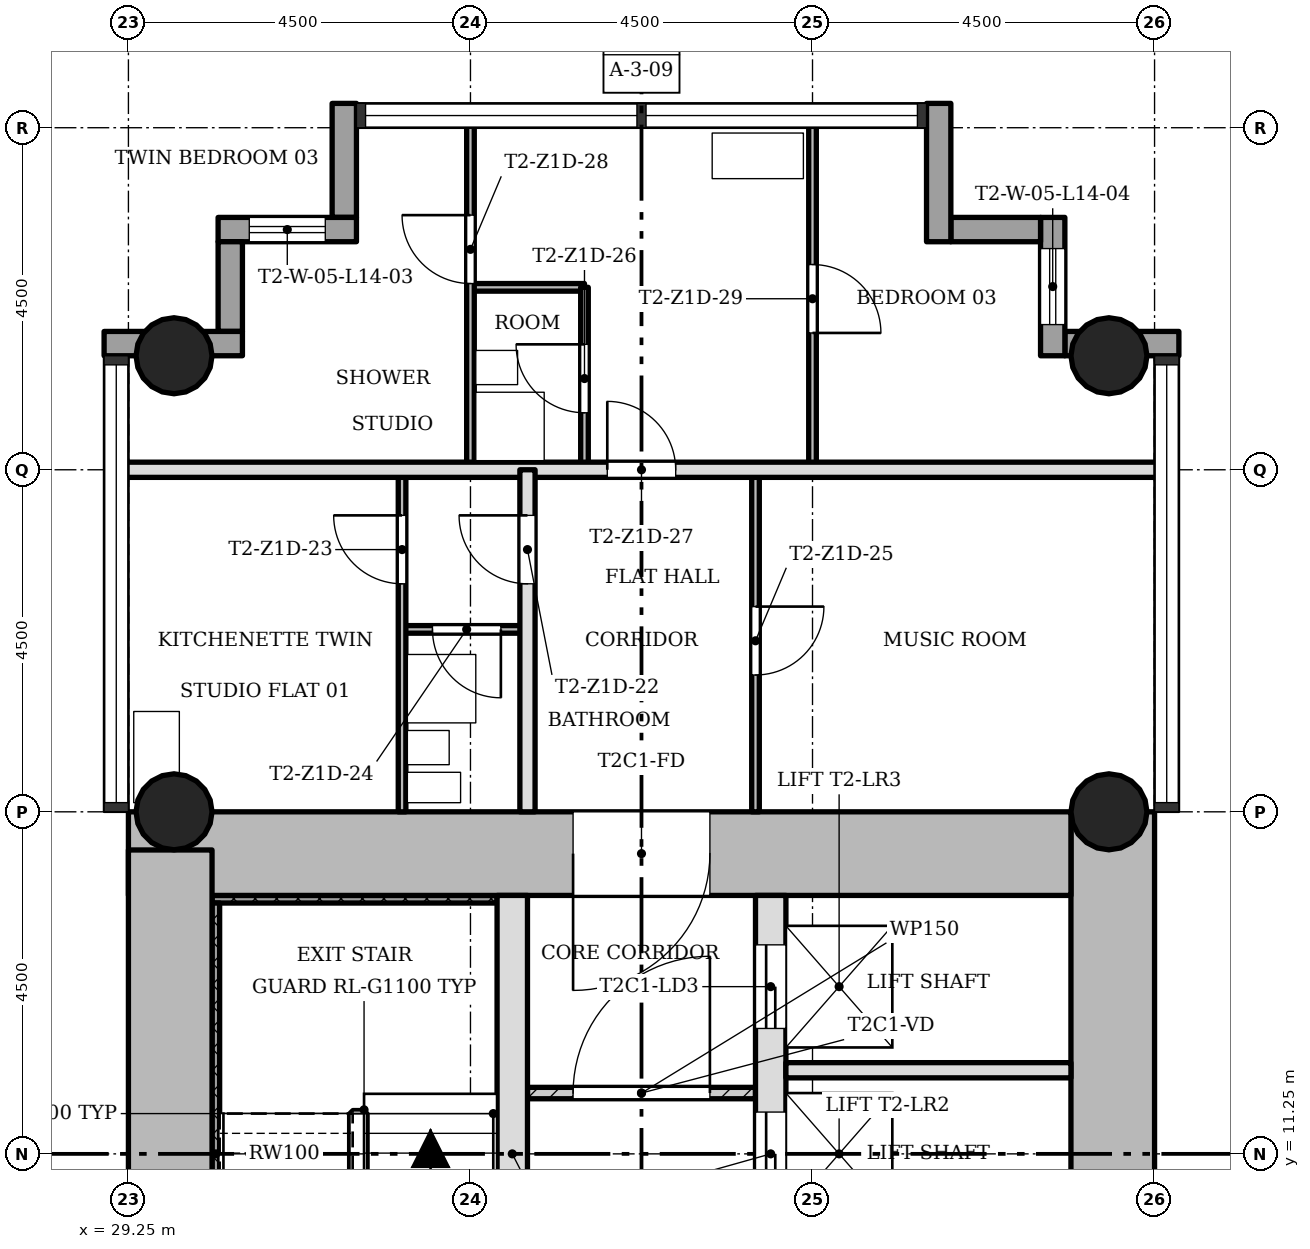
"""IFC4 building model, lengths in metres.
Left out: names, types, materials, properties, quantities, classifications, styles, units other than length and angle.
Written with IfcOpenShell. Run it as: python <this file> out.ifc"""

import sys

from ifc_helpers import new_model, si_unit, direction, frame, frame_2d, origin, origin_2d, place, context, subcontext, project, spatial, rectangle, hollow_circle, extrude, element, fill, save


model = new_model("IFC4")
c1 = context("Model", 3, precision=1e-05, world=origin(), true_north=direction((0.0, 1.0)))
c2 = subcontext(c1, "Body", "Model", "MODEL_VIEW")
j1 = project(units=[si_unit("LENGTHUNIT", "METRE"), si_unit("PLANEANGLEUNIT", "RADIAN")], contexts=[c1])
p1 = place(None, origin())
s1 = spatial("IfcSite", under=j1, at=p1, CompositionType="ELEMENT")
p2 = place(p1, origin())
s2 = spatial("IfcBuilding", under=s1, at=p2, CompositionType="ELEMENT")
p3 = place(p2, frame((0.0, 0.0, 55.1)))
s3 = spatial("IfcBuildingStorey", under=s2, at=p3, CompositionType="ELEMENT", Elevation=55.1)
p4 = place(p3, frame((42.2, 7.85, 0.0), z_axis=(0.0, 0.0, 1.0), x_axis=(0.0, 1.0, 0.0)))
e1 = element("IfcWall", 1, at=p4, inside=s3, PredefinedType="SHEAR", context=c2, shape_type="SweptSolid", body=[
    extrude(rectangle(XDim=7.9, YDim=1.1, at=frame_2d((3.95, 0.0))), origin(), (0.0, 0.0, 1.0), 3.4),
])
p5 = place(p3, frame((41.65, 15.2, 0.0), z_axis=(0.0, 0.0, 1.0), x_axis=(-1.0, 0.0, 0.0)))
e2 = element("IfcWall", 2, at=p5, inside=s3, PredefinedType="SHEAR", context=c2, shape_type="SweptSolid", body=[
    extrude(rectangle(XDim=12.4, YDim=1.1, at=frame_2d((6.2, 0.0))), origin(), (0.0, 0.0, 1.0), 3.4),
])
p6 = place(p5, frame((4.75, 0.0, 0.0)))
e3 = element("IfcOpeningElement", 3, at=p6, cuts=e2, PredefinedType="OPENING", context=c2, shape_type="SweptSolid", body=[
    extrude(rectangle(XDim=1.8, YDim=2.1, at=frame_2d((0.9, 1.05))), frame((0.0, 0.56, 0.0), z_axis=(0.0, -1.0, 0.0), x_axis=(1.0, 0.0, 0.0)), (0.0, 0.0, 1.0), 1.12),
])
p7 = place(p3, frame((29.8, 15.248, 0.0), z_axis=(0.0, 0.0, 1.0), x_axis=(0.0, -1.0, 0.0)))
e4 = element("IfcWall", 4, at=p7, inside=s3, PredefinedType="SHEAR", context=c2, shape_type="SweptSolid", body=[
    extrude(rectangle(XDim=8.596, YDim=1.1, at=frame_2d((4.298, 0.0))), origin(), (0.0, 0.0, 1.0), 3.4),
])
p8 = place(p3, frame((34.3, 7.85, 0.0), z_axis=(0.0, 0.0, 1.0), x_axis=(0.0, 1.0, 0.0)))
e5 = element("IfcWall", 5, at=p8, inside=s3, PredefinedType="SHEAR", context=c2, shape_type="SweptSolid", body=[
    extrude(rectangle(XDim=6.8, YDim=0.4, at=frame_2d((3.4, 0.0))), origin(), (0.0, 0.0, 1.0), 3.4),
])
p9 = place(p8, frame((0.55, 0.0, 0.0)))
e6 = element("IfcOpeningElement", 6, at=p9, cuts=e5, PredefinedType="OPENING", context=c2, shape_type="SweptSolid", body=[
    extrude(rectangle(XDim=0.9, YDim=2.1, at=frame_2d((0.45, 1.05))), frame((0.0, 0.21, 0.0), z_axis=(0.0, -1.0, 0.0), x_axis=(1.0, 0.0, 0.0)), (0.0, 0.0, 1.0), 0.42),
])
p10 = place(p3, frame((37.7, 7.85, 0.0), z_axis=(0.0, 0.0, 1.0), x_axis=(0.0, 1.0, 0.0)))
e7 = element("IfcWall", 7, at=p10, inside=s3, PredefinedType="SHEAR", context=c2, shape_type="SweptSolid", body=[
    extrude(rectangle(XDim=6.8, YDim=0.4, at=frame_2d((3.4, 0.0))), origin(), (0.0, 0.0, 1.0), 3.4),
])
p11 = place(p10, frame((0.65, 0.0, 0.0)))
e8 = element("IfcOpeningElement", 8, at=p11, cuts=e7, PredefinedType="OPENING", context=c2, shape_type="SweptSolid", body=[
    extrude(rectangle(XDim=1.1, YDim=2.1, at=frame_2d((0.55, 1.05))), frame((0.0, 0.21, 0.0), z_axis=(0.0, -1.0, 0.0), x_axis=(1.0, 0.0, 0.0)), (0.0, 0.0, 1.0), 0.42),
])
p12 = place(p10, frame((2.85, 0.0, 0.0)))
e9 = element("IfcOpeningElement", 9, at=p12, cuts=e7, PredefinedType="OPENING", context=c2, shape_type="SweptSolid", body=[
    extrude(rectangle(XDim=1.1, YDim=2.1, at=frame_2d((0.55, 1.05))), frame((0.0, 0.21, 0.0), z_axis=(0.0, -1.0, 0.0), x_axis=(1.0, 0.0, 0.0)), (0.0, 0.0, 1.0), 0.42),
])
p13 = place(p10, frame((5.05, 0.0, 0.0)))
e10 = element("IfcOpeningElement", 10, at=p13, cuts=e7, PredefinedType="OPENING", context=c2, shape_type="SweptSolid", body=[
    extrude(rectangle(XDim=1.1, YDim=2.1, at=frame_2d((0.55, 1.05))), frame((0.0, 0.21, 0.0), z_axis=(0.0, -1.0, 0.0), x_axis=(1.0, 0.0, 0.0)), (0.0, 0.0, 1.0), 0.42),
])
for number, where, z_axis, x_axis in (
    (11, (42.15, 15.75, 0.0), (0.0, 0.0, 1.0), (1.0, 0.0, 0.0)),
    (12, (29.85, 15.75, 0.0), (0.0, 0.0, 1.0), (1.0, 0.0, 0.0)),
    (13, (42.15, 21.75, 0.0), (0.0, 0.0, 1.0), (1.0, 0.0, 0.0)),
    (14, (29.85, 21.75, 0.0), (0.0, 0.0, 1.0), (1.0, 0.0, 0.0)),
):
    element("IfcColumn", number, at=place(p3, frame(where, z_axis=z_axis, x_axis=x_axis)), inside=s3, PredefinedType="COLUMN", context=c2, shape_type="SweptSolid", body=[
        extrude(hollow_circle(Radius=0.5, WallThickness=0.036, at=origin_2d()), origin(), (0.0, 0.0, 1.0), 3.4),
    ])
p14 = place(p3, frame((43.07, 21.91, -0.3), z_axis=(0.0, 0.0, 1.0), x_axis=(-1.0, 0.0, 0.0)))
e15 = element("IfcWall", 15, at=p14, inside=s3, PredefinedType="STANDARD", context=c2, shape_type="SweptSolid", body=[
    extrude(rectangle(XDim=1.5, YDim=0.32, at=frame_2d((0.75, 0.0))), origin(), (0.0, 0.0, 1.0), 3.4),
])
p15 = place(p3, frame((41.41, 21.75, -0.3), z_axis=(0.0, 0.0, 1.0), x_axis=(0.0, 1.0, 0.0)))
e16 = element("IfcWall", 16, at=p15, inside=s3, PredefinedType="STANDARD", context=c2, shape_type="SweptSolid", body=[
    extrude(rectangle(XDim=1.82, YDim=0.32, at=frame_2d((0.91, 0.0))), origin(), (0.0, 0.0, 1.0), 3.4),
])
p16 = place(p15, frame((0.41, 0.0, 1.2)))
e17 = element("IfcOpeningElement", 17, at=p16, cuts=e16, PredefinedType="OPENING", context=c2, shape_type="SweptSolid", body=[
    extrude(rectangle(XDim=1.0, YDim=1.5, at=frame_2d((0.5, 0.75))), frame((0.0, 0.17, 0.0), z_axis=(0.0, -1.0, 0.0), x_axis=(1.0, 0.0, 0.0)), (0.0, 0.0, 1.0), 0.34),
])
p17 = place(p3, frame((41.25, 23.41, -0.3), z_axis=(0.0, 0.0, 1.0), x_axis=(-1.0, 0.0, 0.0)))
e18 = element("IfcWall", 18, at=p17, inside=s3, PredefinedType="STANDARD", context=c2, shape_type="SweptSolid", body=[
    extrude(rectangle(XDim=1.18, YDim=0.32, at=frame_2d((0.59, 0.0))), origin(), (0.0, 0.0, 1.0), 3.4),
])
p18 = place(p3, frame((39.91, 23.25, -0.3), z_axis=(0.0, 0.0, 1.0), x_axis=(0.0, 1.0, 0.0)))
e19 = element("IfcWall", 19, at=p18, inside=s3, PredefinedType="STANDARD", context=c2, shape_type="SweptSolid", body=[
    extrude(rectangle(XDim=1.82, YDim=0.32, at=frame_2d((0.91, 0.0))), origin(), (0.0, 0.0, 1.0), 3.4),
])
p19 = place(p3, frame((32.09, 25.07, -0.3), z_axis=(0.0, 0.0, 1.0), x_axis=(0.0, -1.0, 0.0)))
e20 = element("IfcWall", 20, at=p19, inside=s3, PredefinedType="STANDARD", context=c2, shape_type="SweptSolid", body=[
    extrude(rectangle(XDim=1.5, YDim=0.32, at=frame_2d((0.75, 0.0))), origin(), (0.0, 0.0, 1.0), 3.4),
])
p20 = place(p3, frame((32.25, 23.41, -0.3), z_axis=(0.0, 0.0, 1.0), x_axis=(-1.0, 0.0, 0.0)))
e21 = element("IfcWall", 21, at=p20, inside=s3, PredefinedType="STANDARD", context=c2, shape_type="SweptSolid", body=[
    extrude(rectangle(XDim=1.82, YDim=0.32, at=frame_2d((0.91, 0.0))), origin(), (0.0, 0.0, 1.0), 3.4),
])
p21 = place(p20, frame((0.41, 0.0, 1.2)))
e22 = element("IfcOpeningElement", 22, at=p21, cuts=e21, PredefinedType="OPENING", context=c2, shape_type="SweptSolid", body=[
    extrude(rectangle(XDim=1.0, YDim=1.5, at=frame_2d((0.5, 0.75))), frame((0.0, 0.17, 0.0), z_axis=(0.0, -1.0, 0.0), x_axis=(1.0, 0.0, 0.0)), (0.0, 0.0, 1.0), 0.34),
])
p22 = place(p3, frame((30.59, 23.25, -0.3), z_axis=(0.0, 0.0, 1.0), x_axis=(0.0, -1.0, 0.0)))
e23 = element("IfcWall", 23, at=p22, inside=s3, PredefinedType="STANDARD", context=c2, shape_type="SweptSolid", body=[
    extrude(rectangle(XDim=1.18, YDim=0.32, at=frame_2d((0.59, 0.0))), origin(), (0.0, 0.0, 1.0), 3.4),
])
p23 = place(p3, frame((30.75, 21.91, -0.3), z_axis=(0.0, 0.0, 1.0), x_axis=(-1.0, 0.0, 0.0)))
e24 = element("IfcWall", 24, at=p23, inside=s3, PredefinedType="STANDARD", context=c2, shape_type="SweptSolid", body=[
    extrude(rectangle(XDim=1.82, YDim=0.32, at=frame_2d((0.91, 0.0))), origin(), (0.0, 0.0, 1.0), 3.4),
])
p24 = place(p3, frame((37.5, 12.05, 0.0), z_axis=(0.0, 0.0, 1.0), x_axis=(-1.0, 0.0, 0.0)))
e25 = element("IfcWall", 25, at=p24, inside=s3, PredefinedType="PARTITIONING", context=c2, shape_type="SweptSolid", body=[
    extrude(rectangle(XDim=3.0, YDim=0.15, at=frame_2d((1.5, 0.0))), origin(), (0.0, 0.0, 1.0), 3.0),
])
p25 = place(p24, frame((0.6, 0.0, 0.0)))
e26 = element("IfcOpeningElement", 26, at=p25, cuts=e25, PredefinedType="OPENING", context=c2, shape_type="SweptSolid", body=[
    extrude(rectangle(XDim=1.8, YDim=2.1, at=frame_2d((0.9, 1.05))), frame((0.0, 0.085, 0.0), z_axis=(0.0, -1.0, 0.0), x_axis=(1.0, 0.0, 0.0)), (0.0, 0.0, 1.0), 0.17),
])
p26 = place(p3, frame((41.65, 12.35, 0.0), z_axis=(0.0, 0.0, 1.0), x_axis=(-1.0, 0.0, 0.0)))
e27 = element("IfcWall", 27, at=p26, inside=s3, PredefinedType="SOLIDWALL", context=c2, shape_type="SweptSolid", body=[
    extrude(rectangle(XDim=3.75, YDim=0.2, at=frame_2d((1.875, 0.0))), origin(), (0.0, 0.0, 1.0), 3.0),
])
p27 = place(p3, frame((34.5, 18.15, 0.0), z_axis=(0.0, 0.0, 1.0), x_axis=(-1.0, 0.0, 0.0)))
e28 = element("IfcWall", 28, at=p27, inside=s3, PredefinedType="PARTITIONING", context=c2, shape_type="SweptSolid", body=[
    extrude(rectangle(XDim=1.65, YDim=0.1, at=frame_2d((0.825, 0.0))), origin(), (0.0, 0.0, 1.0), 3.0),
])
p28 = place(p27, frame((0.35, 0.0, 0.0)))
e29 = element("IfcOpeningElement", 29, at=p28, cuts=e28, PredefinedType="OPENING", context=c2, shape_type="SweptSolid", body=[
    extrude(rectangle(XDim=0.9, YDim=2.1, at=frame_2d((0.45, 1.05))), frame((0.0, 0.06, 0.0), z_axis=(0.0, -1.0, 0.0), x_axis=(1.0, 0.0, 0.0)), (0.0, 0.0, 1.0), 0.12),
])
p29 = place(p3, frame((42.85, 20.25, 0.0), z_axis=(0.0, 0.0, 1.0), x_axis=(-1.0, 0.0, 0.0)))
e30 = element("IfcWall", 30, at=p29, inside=s3, PredefinedType="SOLIDWALL", context=c2, shape_type="SweptSolid", body=[
    extrude(rectangle(XDim=13.7, YDim=0.2, at=frame_2d((6.85, 0.0))), origin(), (0.0, 0.0, 1.0), 3.0),
])
p30 = place(p29, frame((6.4, 0.0, 0.0)))
e31 = element("IfcOpeningElement", 31, at=p30, cuts=e30, PredefinedType="OPENING", context=c2, shape_type="SweptSolid", body=[
    extrude(rectangle(XDim=0.9, YDim=2.1, at=frame_2d((0.45, 1.05))), frame((0.0, 0.11, 0.0), z_axis=(0.0, -1.0, 0.0), x_axis=(1.0, 0.0, 0.0)), (0.0, 0.0, 1.0), 0.22),
])
p31 = place(p3, frame((35.25, 22.65, 0.0), z_axis=(0.0, 0.0, 1.0), x_axis=(-1.0, 0.0, 0.0)))
e32 = element("IfcWall", 32, at=p31, inside=s3, PredefinedType="PARTITIONING", context=c2, shape_type="SweptSolid", body=[
    extrude(rectangle(XDim=1.5, YDim=0.1, at=frame_2d((0.75, 0.0))), origin(), (0.0, 0.0, 1.0), 3.0),
])
p32 = place(p3, frame((38.25, 20.25, 0.0), z_axis=(0.0, 0.0, 1.0), x_axis=(0.0, 1.0, 0.0)))
e33 = element("IfcWall", 33, at=p32, inside=s3, PredefinedType="PARTITIONING", context=c2, shape_type="SweptSolid", body=[
    extrude(rectangle(XDim=4.6, YDim=0.1, at=frame_2d((2.3, 0.0))), origin(), (0.0, 0.0, 1.0), 3.0),
])
p33 = place(p32, frame((1.8, 0.0, 0.0)))
e34 = element("IfcOpeningElement", 34, at=p33, cuts=e33, PredefinedType="OPENING", context=c2, shape_type="SweptSolid", body=[
    extrude(rectangle(XDim=0.9, YDim=2.1, at=frame_2d((0.45, 1.05))), frame((0.0, 0.06, 0.0), z_axis=(0.0, -1.0, 0.0), x_axis=(1.0, 0.0, 0.0)), (0.0, 0.0, 1.0), 0.12),
])
p34 = place(p3, frame((37.5, 15.75, 0.0), z_axis=(0.0, 0.0, 1.0), x_axis=(0.0, 1.0, 0.0)))
e35 = element("IfcWall", 35, at=p34, inside=s3, PredefinedType="PARTITIONING", context=c2, shape_type="SweptSolid", body=[
    extrude(rectangle(XDim=4.5, YDim=0.1, at=frame_2d((2.25, 0.0))), origin(), (0.0, 0.0, 1.0), 3.0),
])
p35 = place(p34, frame((1.8, 0.0, 0.0)))
e36 = element("IfcOpeningElement", 36, at=p35, cuts=e35, PredefinedType="OPENING", context=c2, shape_type="SweptSolid", body=[
    extrude(rectangle(XDim=0.9, YDim=2.1, at=frame_2d((0.45, 1.05))), frame((0.0, 0.06, 0.0), z_axis=(0.0, -1.0, 0.0), x_axis=(1.0, 0.0, 0.0)), (0.0, 0.0, 1.0), 0.12),
])
p36 = place(p3, frame((35.25, 20.25, 0.0), z_axis=(0.0, 0.0, 1.0), x_axis=(0.0, 1.0, 0.0)))
e37 = element("IfcWall", 37, at=p36, inside=s3, PredefinedType="PARTITIONING", context=c2, shape_type="SweptSolid", body=[
    extrude(rectangle(XDim=2.4, YDim=0.1, at=frame_2d((1.2, 0.0))), origin(), (0.0, 0.0, 1.0), 3.0),
])
p37 = place(p36, frame((0.75, 0.0, 0.0)))
e38 = element("IfcOpeningElement", 38, at=p37, cuts=e37, PredefinedType="OPENING", context=c2, shape_type="SweptSolid", body=[
    extrude(rectangle(XDim=0.9, YDim=2.1, at=frame_2d((0.45, 1.05))), frame((0.0, 0.06, 0.0), z_axis=(0.0, -1.0, 0.0), x_axis=(1.0, 0.0, 0.0)), (0.0, 0.0, 1.0), 0.12),
])
p38 = place(p3, frame((34.5, 15.75, 0.0), z_axis=(0.0, 0.0, 1.0), x_axis=(0.0, 1.0, 0.0)))
e39 = element("IfcWall", 39, at=p38, inside=s3, PredefinedType="SOLIDWALL", context=c2, shape_type="SweptSolid", body=[
    extrude(rectangle(XDim=4.5, YDim=0.2, at=frame_2d((2.25, 0.0))), origin(), (0.0, 0.0, 1.0), 3.0),
])
p39 = place(p38, frame((3.0, 0.0, 0.0)))
e40 = element("IfcOpeningElement", 40, at=p39, cuts=e39, PredefinedType="OPENING", context=c2, shape_type="SweptSolid", body=[
    extrude(rectangle(XDim=0.9, YDim=2.1, at=frame_2d((0.45, 1.05))), frame((0.0, 0.11, 0.0), z_axis=(0.0, -1.0, 0.0), x_axis=(1.0, 0.0, 0.0)), (0.0, 0.0, 1.0), 0.22),
])
p40 = place(p3, frame((33.75, 20.25, 0.0), z_axis=(0.0, 0.0, 1.0), x_axis=(0.0, 1.0, 0.0)))
e41 = element("IfcWall", 41, at=p40, inside=s3, PredefinedType="PARTITIONING", context=c2, shape_type="SweptSolid", body=[
    extrude(rectangle(XDim=4.6, YDim=0.1, at=frame_2d((2.3, 0.0))), origin(), (0.0, 0.0, 1.0), 3.0),
])
p41 = place(p40, frame((2.45, 0.0, 0.0)))
e42 = element("IfcOpeningElement", 42, at=p41, cuts=e41, PredefinedType="OPENING", context=c2, shape_type="SweptSolid", body=[
    extrude(rectangle(XDim=0.9, YDim=2.1, at=frame_2d((0.45, 1.05))), frame((0.0, 0.06, 0.0), z_axis=(0.0, -1.0, 0.0), x_axis=(1.0, 0.0, 0.0)), (0.0, 0.0, 1.0), 0.12),
])
p42 = place(p3, frame((32.85, 15.75, 0.0), z_axis=(0.0, 0.0, 1.0), x_axis=(0.0, 1.0, 0.0)))
e43 = element("IfcWall", 43, at=p42, inside=s3, PredefinedType="PARTITIONING", context=c2, shape_type="SweptSolid", body=[
    extrude(rectangle(XDim=4.5, YDim=0.1, at=frame_2d((2.25, 0.0))), origin(), (0.0, 0.0, 1.0), 3.0),
])
p43 = place(p42, frame((3.0, 0.0, 0.0)))
e44 = element("IfcOpeningElement", 44, at=p43, cuts=e43, PredefinedType="OPENING", context=c2, shape_type="SweptSolid", body=[
    extrude(rectangle(XDim=0.9, YDim=2.1, at=frame_2d((0.45, 1.05))), frame((0.0, 0.06, 0.0), z_axis=(0.0, -1.0, 0.0), x_axis=(1.0, 0.0, 0.0)), (0.0, 0.0, 1.0), 0.12),
])
p44 = place(p3, frame((34.1, 14.6, 0.0), z_axis=(0.0, 0.0, 1.0), x_axis=(-1.0, 0.0, 0.0)))
e45 = element("IfcWall", 45, at=p44, inside=s3, PredefinedType="SHEAR", context=c2, shape_type="SweptSolid", body=[
    extrude(rectangle(XDim=3.75, YDim=0.1, at=frame_2d((1.875, 0.0))), origin(), (0.0, 0.0, 1.0), 3.4),
])
p45 = place(p3, frame((30.4, 7.95, 0.0), z_axis=(0.0, 0.0, 1.0), x_axis=(0.0, 1.0, 0.0)))
e46 = element("IfcWall", 46, at=p45, inside=s3, PredefinedType="SHEAR", context=c2, shape_type="SweptSolid", body=[
    extrude(rectangle(XDim=6.6, YDim=0.1, at=frame_2d((3.3, 0.0))), origin(), (0.0, 0.0, 1.0), 3.4),
])
p46 = place(p25, origin())
e47 = element("IfcDoor", 47, at=p46, inside=s3, OperationType="SINGLE_SWING_LEFT", PredefinedType="DOOR", context=c2, shape_type="SweptSolid", body=[
    extrude(rectangle(XDim=1.8, YDim=2.1, at=frame_2d((0.9, 1.05))), frame((0.0, 0.025, 0.0), z_axis=(0.0, -1.0, 0.0), x_axis=(1.0, 0.0, 0.0)), (0.0, 0.0, 1.0), 0.05),
])
fill(e26, e47)
p47 = place(p39, origin())
e48 = element("IfcDoor", 48, at=p47, inside=s3, OperationType="SINGLE_SWING_LEFT", PredefinedType="DOOR", context=c2, shape_type="SweptSolid", body=[
    extrude(rectangle(XDim=0.9, YDim=2.1, at=frame_2d((0.45, 1.05))), frame((0.0, 0.025, 0.0), z_axis=(0.0, -1.0, 0.0), x_axis=(1.0, 0.0, 0.0)), (0.0, 0.0, 1.0), 0.05),
])
fill(e40, e48)
p48 = place(p43, origin())
e49 = element("IfcDoor", 49, at=p48, inside=s3, OperationType="SINGLE_SWING_LEFT", PredefinedType="DOOR", context=c2, shape_type="SweptSolid", body=[
    extrude(rectangle(XDim=0.9, YDim=2.1, at=frame_2d((0.45, 1.05))), frame((0.0, 0.025, 0.0), z_axis=(0.0, -1.0, 0.0), x_axis=(1.0, 0.0, 0.0)), (0.0, 0.0, 1.0), 0.05),
])
fill(e44, e49)
p49 = place(p28, origin())
e50 = element("IfcDoor", 50, at=p49, inside=s3, OperationType="SINGLE_SWING_RIGHT", PredefinedType="DOOR", context=c2, shape_type="SweptSolid", body=[
    extrude(rectangle(XDim=0.9, YDim=2.1, at=frame_2d((0.45, 1.05))), frame((0.0, 0.025, 0.0), z_axis=(0.0, -1.0, 0.0), x_axis=(1.0, 0.0, 0.0)), (0.0, 0.0, 1.0), 0.05),
])
fill(e29, e50)
p50 = place(p35, origin())
e51 = element("IfcDoor", 51, at=p50, inside=s3, OperationType="SINGLE_SWING_RIGHT", PredefinedType="DOOR", context=c2, shape_type="SweptSolid", body=[
    extrude(rectangle(XDim=0.9, YDim=2.1, at=frame_2d((0.45, 1.05))), frame((0.0, 0.025, 0.0), z_axis=(0.0, -1.0, 0.0), x_axis=(1.0, 0.0, 0.0)), (0.0, 0.0, 1.0), 0.05),
])
fill(e36, e51)
p51 = place(p37, origin())
e52 = element("IfcDoor", 52, at=p51, inside=s3, OperationType="SINGLE_SWING_LEFT", PredefinedType="DOOR", context=c2, shape_type="SweptSolid", body=[
    extrude(rectangle(XDim=0.9, YDim=2.1, at=frame_2d((0.45, 1.05))), frame((0.0, 0.025, 0.0), z_axis=(0.0, -1.0, 0.0), x_axis=(1.0, 0.0, 0.0)), (0.0, 0.0, 1.0), 0.05),
])
fill(e38, e52)
p52 = place(p30, origin())
e53 = element("IfcDoor", 53, at=p52, inside=s3, OperationType="SINGLE_SWING_RIGHT", PredefinedType="DOOR", context=c2, shape_type="SweptSolid", body=[
    extrude(rectangle(XDim=0.9, YDim=2.1, at=frame_2d((0.45, 1.05))), frame((0.0, 0.025, 0.0), z_axis=(0.0, -1.0, 0.0), x_axis=(1.0, 0.0, 0.0)), (0.0, 0.0, 1.0), 0.05),
])
fill(e31, e53)
p53 = place(p41, origin())
e54 = element("IfcDoor", 54, at=p53, inside=s3, OperationType="SINGLE_SWING_LEFT", PredefinedType="DOOR", context=c2, shape_type="SweptSolid", body=[
    extrude(rectangle(XDim=0.9, YDim=2.1, at=frame_2d((0.45, 1.05))), frame((0.0, 0.025, 0.0), z_axis=(0.0, -1.0, 0.0), x_axis=(1.0, 0.0, 0.0)), (0.0, 0.0, 1.0), 0.05),
])
fill(e42, e54)
p54 = place(p33, origin())
e55 = element("IfcDoor", 55, at=p54, inside=s3, OperationType="SINGLE_SWING_LEFT", PredefinedType="DOOR", context=c2, shape_type="SweptSolid", body=[
    extrude(rectangle(XDim=0.9, YDim=2.1, at=frame_2d((0.45, 1.05))), frame((0.0, 0.025, 0.0), z_axis=(0.0, -1.0, 0.0), x_axis=(1.0, 0.0, 0.0)), (0.0, 0.0, 1.0), 0.05),
])
fill(e34, e55)
p55 = place(p12, origin())
e56 = element("IfcDoor", 56, at=p55, inside=s3, OperationType="SLIDING_TO_LEFT", PredefinedType="DOOR", context=c2, shape_type="SweptSolid", body=[
    extrude(rectangle(XDim=1.1, YDim=2.1, at=frame_2d((0.55, 1.05))), frame((0.0, 0.025, 0.0), z_axis=(0.0, -1.0, 0.0), x_axis=(1.0, 0.0, 0.0)), (0.0, 0.0, 1.0), 0.05),
])
fill(e9, e56)
p56 = place(p13, origin())
e57 = element("IfcDoor", 57, at=p56, inside=s3, OperationType="SLIDING_TO_LEFT", PredefinedType="DOOR", context=c2, shape_type="SweptSolid", body=[
    extrude(rectangle(XDim=1.1, YDim=2.1, at=frame_2d((0.55, 1.05))), frame((0.0, 0.025, 0.0), z_axis=(0.0, -1.0, 0.0), x_axis=(1.0, 0.0, 0.0)), (0.0, 0.0, 1.0), 0.05),
])
fill(e10, e57)
p57 = place(p6, origin())
e58 = element("IfcDoor", 58, at=p57, inside=s3, OperationType="SINGLE_SWING_LEFT", PredefinedType="DOOR", context=c2, shape_type="SweptSolid", body=[
    extrude(rectangle(XDim=1.8, YDim=2.1, at=frame_2d((0.9, 1.05))), frame((0.0, 0.025, 0.0), z_axis=(0.0, -1.0, 0.0), x_axis=(1.0, 0.0, 0.0)), (0.0, 0.0, 1.0), 0.05),
])
fill(e3, e58)
p58 = place(p21, origin())
e59 = element("IfcWindow", 59, at=p58, inside=s3, PartitioningType="SINGLE_PANEL", PredefinedType="WINDOW", context=c2, shape_type="SweptSolid", body=[
    extrude(rectangle(XDim=1.0, YDim=1.5, at=frame_2d((0.5, 0.75))), frame((0.0, 0.03, 0.0), z_axis=(0.0, -1.0, 0.0), x_axis=(1.0, 0.0, 0.0)), (0.0, 0.0, 1.0), 0.06),
])
fill(e22, e59)
p59 = place(p16, origin())
e60 = element("IfcWindow", 60, at=p59, inside=s3, PartitioningType="SINGLE_PANEL", PredefinedType="WINDOW", context=c2, shape_type="SweptSolid", body=[
    extrude(rectangle(XDim=1.0, YDim=1.5, at=frame_2d((0.5, 0.75))), frame((0.0, 0.03, 0.0), z_axis=(0.0, -1.0, 0.0), x_axis=(1.0, 0.0, 0.0)), (0.0, 0.0, 1.0), 0.06),
])
fill(e17, e60)
save(model, sys.argv[1])
